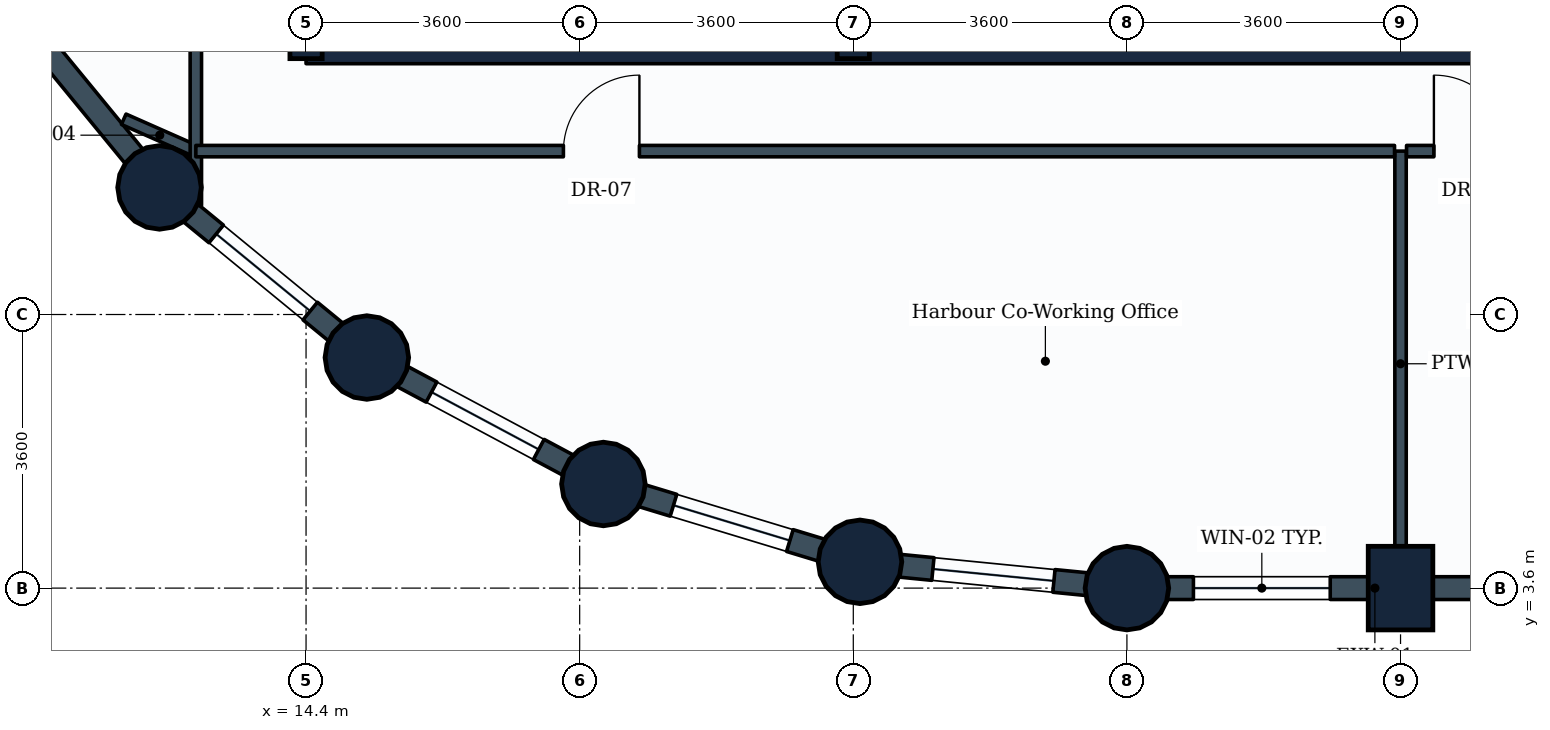
"""IFC4 building model, lengths in metres.
Left out: names, types, materials, properties, quantities, classifications, styles, units other than length and angle.
Written with IfcOpenShell. Run it as: python <this file> out.ifc"""

import sys

from ifc_helpers import new_model, si_unit, direction, frame, frame_2d, origin, origin_2d, place, context, subcontext, project, spatial, rectangle, circle, i_section, extrude, element, fill, save


model = new_model("IFC4")
c1 = context("Model", 3, precision=1e-05, world=origin(), true_north=direction((0.0, 1.0)))
c2 = subcontext(c1, "Body", "Model", "MODEL_VIEW")
j1 = project(units=[si_unit("LENGTHUNIT", "METRE"), si_unit("PLANEANGLEUNIT", "RADIAN")], contexts=[c1])
p1 = place(None, origin())
s1 = spatial("IfcSite", under=j1, at=p1, CompositionType="ELEMENT")
p2 = place(p1, origin())
s2 = spatial("IfcBuilding", under=s1, at=p2, CompositionType="ELEMENT")
p3 = place(p2, frame((0.0, 0.0, 80.1)))
s3 = spatial("IfcBuildingStorey", under=s2, at=p3, CompositionType="ELEMENT", Elevation=80.1)
p4 = place(p3, frame((12.472, 8.872, 0.0), z_axis=(0.0, 0.0, 1.0), x_axis=(1.0, 0.0, 0.0)))
e1 = element("IfcColumn", 1, at=p4, inside=s3, PredefinedType="COLUMN", context=c2, shape_type="SweptSolid", body=[
    extrude(circle(Radius=0.55, at=origin_2d()), origin(), (0.0, 0.0, 1.0), 3.9),
])
p5 = place(p3, frame((14.4, 10.8, 0.0), z_axis=(0.0, 0.0, 1.0), x_axis=(1.0, 0.0, 0.0)))
e2 = element("IfcColumn", 2, at=p5, inside=s3, PredefinedType="COLUMN", context=c2, shape_type="SweptSolid", body=[
    extrude(i_section(OverallWidth=0.424, OverallDepth=0.467, WebThickness=0.033, FlangeThickness=0.053, FilletRadius=0.015, at=origin_2d()), origin(), (0.0, 0.0, 1.0), 3.9),
])
for number, where, z_axis, x_axis in (
    (3, (15.2, 6.634, 0.0), (0.0, 0.0, 1.0), (1.0, 0.0, 0.0)),
    (4, (18.312, 4.97, 0.0), (0.0, 0.0, 1.0), (1.0, 0.0, 0.0)),
):
    element("IfcColumn", number, at=place(p3, frame(where, z_axis=z_axis, x_axis=x_axis)), inside=s3, PredefinedType="COLUMN", context=c2, shape_type="SweptSolid", body=[
        extrude(circle(Radius=0.55, at=origin_2d()), origin(), (0.0, 0.0, 1.0), 3.9),
    ])
p6 = place(p3, frame((21.6, 10.8, 0.0), z_axis=(0.0, 0.0, 1.0), x_axis=(1.0, 0.0, 0.0)))
e5 = element("IfcColumn", 5, at=p6, inside=s3, PredefinedType="COLUMN", context=c2, shape_type="SweptSolid", body=[
    extrude(i_section(OverallWidth=0.424, OverallDepth=0.467, WebThickness=0.033, FlangeThickness=0.053, FilletRadius=0.015, at=origin_2d()), origin(), (0.0, 0.0, 1.0), 3.9),
])
for number, where, z_axis, x_axis in (
    (6, (21.688, 3.946, 0.0), (0.0, 0.0, 1.0), (1.0, 0.0, 0.0)),
    (7, (25.2, 3.6, 0.0), (0.0, 0.0, 1.0), (1.0, 0.0, 0.0)),
):
    element("IfcColumn", number, at=place(p3, frame(where, z_axis=z_axis, x_axis=x_axis)), inside=s3, PredefinedType="COLUMN", context=c2, shape_type="SweptSolid", body=[
        extrude(circle(Radius=0.55, at=origin_2d()), origin(), (0.0, 0.0, 1.0), 3.9),
    ])
p7 = place(p3, frame((28.8, 3.6, 0.0), z_axis=(0.0, 0.0, 1.0), x_axis=(1.0, 0.0, 0.0)))
e8 = element("IfcColumn", 8, at=p7, inside=s3, PredefinedType="COLUMN", context=c2, shape_type="SweptSolid", body=[
    extrude(rectangle(XDim=0.85, YDim=1.1, at=origin_2d()), origin(), (0.0, 0.0, 1.0), 3.9),
])
p8 = place(p3, frame((28.8, 3.6, 0.0), z_axis=(0.0, 0.0, 1.0), x_axis=(-1.0, 0.0, 0.0)))
e9 = element("IfcWall", 9, at=p8, inside=s3, PredefinedType="STANDARD", context=c2, shape_type="SweptSolid", body=[
    extrude(rectangle(XDim=3.6, YDim=0.3, at=frame_2d((1.8, 0.0))), origin(), (0.0, 0.0, 1.0), 2.93),
])
p9 = place(p8, frame((0.925, 0.0, 0.85)))
e10 = element("IfcOpeningElement", 10, at=p9, cuts=e9, PredefinedType="OPENING", context=c2, shape_type="SweptSolid", body=[
    extrude(rectangle(XDim=1.8, YDim=1.35, at=frame_2d((0.9, 0.675))), frame((0.0, 0.16, 0.0), z_axis=(0.0, -1.0, 0.0), x_axis=(1.0, 0.0, 0.0)), (0.0, 0.0, 1.0), 0.32),
])
p10 = place(p3, frame((32.4, 3.6, 0.0), z_axis=(0.0, 0.0, 1.0), x_axis=(-1.0, 0.0, 0.0)))
e11 = element("IfcWall", 11, at=p10, inside=s3, PredefinedType="STANDARD", context=c2, shape_type="SweptSolid", body=[
    extrude(rectangle(XDim=3.6, YDim=0.3, at=frame_2d((1.8, 0.0))), origin(), (0.0, 0.0, 1.0), 2.93),
])
p11 = place(p3, frame((12.472, 8.872, 0.0), z_axis=(0.0, 0.0, 1.0), x_axis=(-0.634258295121, 0.773121216285, 0.0)))
e12 = element("IfcWall", 12, at=p11, inside=s3, PredefinedType="STANDARD", context=c2, shape_type="SweptSolid", body=[
    extrude(rectangle(XDim=3.529, YDim=0.3, at=frame_2d((1.764, 0.0))), origin(), (0.0, 0.0, 1.0), 2.93),
])
p12 = place(p3, frame((15.2, 6.634, 0.0), z_axis=(0.0, 0.0, 1.0), x_axis=(-0.773121216285, 0.634258295121, 0.0)))
e13 = element("IfcWall", 13, at=p12, inside=s3, PredefinedType="STANDARD", context=c2, shape_type="SweptSolid", body=[
    extrude(rectangle(XDim=3.529, YDim=0.3, at=frame_2d((1.764, 0.0))), origin(), (0.0, 0.0, 1.0), 2.93),
])
p13 = place(p12, frame((0.964, 0.0, 0.85)))
e14 = element("IfcOpeningElement", 14, at=p13, cuts=e13, PredefinedType="OPENING", context=c2, shape_type="SweptSolid", body=[
    extrude(rectangle(XDim=1.6, YDim=1.35, at=frame_2d((0.8, 0.675))), frame((0.0, 0.16, 0.0), z_axis=(0.0, -1.0, 0.0), x_axis=(1.0, 0.0, 0.0)), (0.0, 0.0, 1.0), 0.32),
])
p14 = place(p3, frame((18.312, 4.97, 0.0), z_axis=(0.0, 0.0, 1.0), x_axis=(-0.881846862014, 0.471535907389, 0.0)))
e15 = element("IfcWall", 15, at=p14, inside=s3, PredefinedType="STANDARD", context=c2, shape_type="SweptSolid", body=[
    extrude(rectangle(XDim=3.529, YDim=0.3, at=frame_2d((1.765, 0.0))), origin(), (0.0, 0.0, 1.0), 2.93),
])
p15 = place(p14, frame((0.964, 0.0, 0.85)))
e16 = element("IfcOpeningElement", 16, at=p15, cuts=e15, PredefinedType="OPENING", context=c2, shape_type="SweptSolid", body=[
    extrude(rectangle(XDim=1.6, YDim=1.35, at=frame_2d((0.8, 0.675))), frame((0.0, 0.16, 0.0), z_axis=(0.0, -1.0, 0.0), x_axis=(1.0, 0.0, 0.0)), (0.0, 0.0, 1.0), 0.32),
])
p16 = place(p3, frame((21.688, 3.946, 0.0), z_axis=(0.0, 0.0, 1.0), x_axis=(-0.956953367403, 0.290241714123, 0.0)))
e17 = element("IfcWall", 17, at=p16, inside=s3, PredefinedType="STANDARD", context=c2, shape_type="SweptSolid", body=[
    extrude(rectangle(XDim=3.528, YDim=0.3, at=frame_2d((1.764, 0.0))), origin(), (0.0, 0.0, 1.0), 2.93),
])
p17 = place(p16, frame((0.964, 0.0, 0.85)))
e18 = element("IfcOpeningElement", 18, at=p17, cuts=e17, PredefinedType="OPENING", context=c2, shape_type="SweptSolid", body=[
    extrude(rectangle(XDim=1.6, YDim=1.35, at=frame_2d((0.8, 0.675))), frame((0.0, 0.16, 0.0), z_axis=(0.0, -1.0, 0.0), x_axis=(1.0, 0.0, 0.0)), (0.0, 0.0, 1.0), 0.32),
])
p18 = place(p3, frame((25.2, 3.6, 0.0), z_axis=(0.0, 0.0, 1.0), x_axis=(-0.995183369056, 0.098030923459, 0.0)))
e19 = element("IfcWall", 19, at=p18, inside=s3, PredefinedType="STANDARD", context=c2, shape_type="SweptSolid", body=[
    extrude(rectangle(XDim=3.529, YDim=0.3, at=frame_2d((1.765, 0.0))), origin(), (0.0, 0.0, 1.0), 2.93),
])
p19 = place(p18, frame((0.965, 0.0, 0.85)))
e20 = element("IfcOpeningElement", 20, at=p19, cuts=e19, PredefinedType="OPENING", context=c2, shape_type="SweptSolid", body=[
    extrude(rectangle(XDim=1.6, YDim=1.35, at=frame_2d((0.8, 0.675))), frame((0.0, 0.16, 0.0), z_axis=(0.0, -1.0, 0.0), x_axis=(1.0, 0.0, 0.0)), (0.0, 0.0, 1.0), 0.32),
])
p20 = place(p3, frame((14.4, 10.8, 0.0), z_axis=(0.0, 0.0, 1.0), x_axis=(1.0, 0.0, 0.0)))
e21 = element("IfcWall", 21, at=p20, inside=s3, PredefinedType="SHEAR", context=c2, shape_type="SweptSolid", body=[
    extrude(rectangle(XDim=18.0, YDim=0.6, at=frame_2d((9.0, 0.0))), origin(), (0.0, 0.0, 1.0), 3.65),
])
p21 = place(p3, frame((28.8, 9.35, 0.0), z_axis=(0.0, 0.0, 1.0), x_axis=(0.0, -1.0, 0.0)))
e22 = element("IfcWall", 22, at=p21, inside=s3, PredefinedType="PARTITIONING", context=c2, shape_type="SweptSolid", body=[
    extrude(rectangle(XDim=5.596, YDim=0.15, at=frame_2d((2.798, 0.0))), origin(), (0.0, 0.0, 1.0), 3.635),
])
p22 = place(p3, frame((12.95, 9.35, 0.0), z_axis=(0.0, 0.0, 1.0), x_axis=(-0.914692674918, 0.40415010881, 0.0)))
e23 = element("IfcWall", 23, at=p22, inside=s3, PredefinedType="PARTITIONING", context=c2, shape_type="SweptSolid", body=[
    extrude(rectangle(XDim=1.037, YDim=0.15, at=frame_2d((0.519, 0.0))), origin(), (0.0, 0.0, 1.0), 2.93),
])
p23 = place(p3, frame((12.95, 8.634, 0.0), z_axis=(0.0, 0.0, 1.0), x_axis=(0.0, 1.0, 0.0)))
e24 = element("IfcWall", 24, at=p23, inside=s3, PredefinedType="PARTITIONING", context=c2, shape_type="SweptSolid", body=[
    extrude(rectangle(XDim=16.487, YDim=0.15, at=frame_2d((8.244, 0.0))), origin(), (0.0, 0.0, 1.0), 2.93),
])
p24 = place(p23, frame((7.706, 0.0, 0.0)))
e25 = element("IfcOpeningElement", 25, at=p24, cuts=e24, PredefinedType="OPENING", context=c2, shape_type="SweptSolid", body=[
    extrude(rectangle(XDim=1.0, YDim=2.1, at=frame_2d((0.5, 1.05))), frame((0.0, 0.085, 0.0), z_axis=(0.0, -1.0, 0.0), x_axis=(1.0, 0.0, 0.0)), (0.0, 0.0, 1.0), 0.17),
])
p25 = place(p3, frame((12.95, 9.35, 0.0), z_axis=(0.0, 0.0, 1.0), x_axis=(1.0, 0.0, 0.0)))
e26 = element("IfcWall", 26, at=p25, inside=s3, PredefinedType="PARTITIONING", context=c2, shape_type="SweptSolid", body=[
    extrude(rectangle(XDim=15.771, YDim=0.15, at=frame_2d((7.885, 0.0))), origin(), (0.0, 0.0, 1.0), 3.18),
])
p26 = place(p25, frame((4.836, 0.0, 0.0)))
e27 = element("IfcOpeningElement", 27, at=p26, cuts=e26, PredefinedType="OPENING", context=c2, shape_type="SweptSolid", body=[
    extrude(rectangle(XDim=1.0, YDim=2.1, at=frame_2d((0.5, 1.05))), frame((0.0, 0.085, 0.0), z_axis=(0.0, -1.0, 0.0), x_axis=(1.0, 0.0, 0.0)), (0.0, 0.0, 1.0), 0.17),
])
p27 = place(p3, frame((28.879, 9.35, 0.0), z_axis=(0.0, 0.0, 1.0), x_axis=(1.0, 0.0, 0.0)))
e28 = element("IfcWall", 28, at=p27, inside=s3, PredefinedType="PARTITIONING", context=c2, shape_type="SweptSolid", body=[
    extrude(rectangle(XDim=5.521, YDim=0.15, at=frame_2d((2.76, 0.0))), origin(), (0.0, 0.0, 1.0), 3.635),
])
p28 = place(p27, frame((0.36, 0.0, 0.0)))
e29 = element("IfcOpeningElement", 29, at=p28, cuts=e28, PredefinedType="OPENING", context=c2, shape_type="SweptSolid", body=[
    extrude(rectangle(XDim=1.0, YDim=2.1, at=frame_2d((0.5, 1.05))), frame((0.0, 0.085, 0.0), z_axis=(0.0, -1.0, 0.0), x_axis=(1.0, 0.0, 0.0)), (0.0, 0.0, 1.0), 0.17),
])
p29 = place(p9, origin())
e30 = element("IfcWindow", 30, at=p29, inside=s3, PartitioningType="SINGLE_PANEL", PredefinedType="WINDOW", context=c2, shape_type="SweptSolid", body=[
    extrude(rectangle(XDim=1.8, YDim=1.35, at=frame_2d((0.9, 0.675))), frame((0.0, 0.03, 0.0), z_axis=(0.0, -1.0, 0.0), x_axis=(1.0, 0.0, 0.0)), (0.0, 0.0, 1.0), 0.06),
])
fill(e10, e30)
p30 = place(p13, origin())
e31 = element("IfcWindow", 31, at=p30, inside=s3, PartitioningType="SINGLE_PANEL", PredefinedType="WINDOW", context=c2, shape_type="SweptSolid", body=[
    extrude(rectangle(XDim=1.6, YDim=1.35, at=frame_2d((0.8, 0.675))), frame((0.0, 0.03, 0.0), z_axis=(0.0, -1.0, 0.0), x_axis=(1.0, 0.0, 0.0)), (0.0, 0.0, 1.0), 0.06),
])
fill(e14, e31)
p31 = place(p15, origin())
e32 = element("IfcWindow", 32, at=p31, inside=s3, PartitioningType="SINGLE_PANEL", PredefinedType="WINDOW", context=c2, shape_type="SweptSolid", body=[
    extrude(rectangle(XDim=1.6, YDim=1.35, at=frame_2d((0.8, 0.675))), frame((0.0, 0.03, 0.0), z_axis=(0.0, -1.0, 0.0), x_axis=(1.0, 0.0, 0.0)), (0.0, 0.0, 1.0), 0.06),
])
fill(e16, e32)
p32 = place(p17, origin())
e33 = element("IfcWindow", 33, at=p32, inside=s3, PartitioningType="SINGLE_PANEL", PredefinedType="WINDOW", context=c2, shape_type="SweptSolid", body=[
    extrude(rectangle(XDim=1.6, YDim=1.35, at=frame_2d((0.8, 0.675))), frame((0.0, 0.03, 0.0), z_axis=(0.0, -1.0, 0.0), x_axis=(1.0, 0.0, 0.0)), (0.0, 0.0, 1.0), 0.06),
])
fill(e18, e33)
p33 = place(p19, origin())
e34 = element("IfcWindow", 34, at=p33, inside=s3, PartitioningType="SINGLE_PANEL", PredefinedType="WINDOW", context=c2, shape_type="SweptSolid", body=[
    extrude(rectangle(XDim=1.6, YDim=1.35, at=frame_2d((0.8, 0.675))), frame((0.0, 0.03, 0.0), z_axis=(0.0, -1.0, 0.0), x_axis=(1.0, 0.0, 0.0)), (0.0, 0.0, 1.0), 0.06),
])
fill(e20, e34)
p34 = place(p26, origin())
e35 = element("IfcDoor", 35, at=p34, inside=s3, OperationType="SINGLE_SWING_RIGHT", PredefinedType="DOOR", context=c2, shape_type="SweptSolid", body=[
    extrude(rectangle(XDim=1.0, YDim=2.1, at=frame_2d((0.5, 1.05))), frame((0.0, 0.025, 0.0), z_axis=(0.0, -1.0, 0.0), x_axis=(1.0, 0.0, 0.0)), (0.0, 0.0, 1.0), 0.05),
])
fill(e27, e35)
p35 = place(p28, origin())
e36 = element("IfcDoor", 36, at=p35, inside=s3, OperationType="SINGLE_SWING_LEFT", PredefinedType="DOOR", context=c2, shape_type="SweptSolid", body=[
    extrude(rectangle(XDim=1.0, YDim=2.1, at=frame_2d((0.5, 1.05))), frame((0.0, 0.025, 0.0), z_axis=(0.0, -1.0, 0.0), x_axis=(1.0, 0.0, 0.0)), (0.0, 0.0, 1.0), 0.05),
])
fill(e29, e36)
save(model, sys.argv[1])
